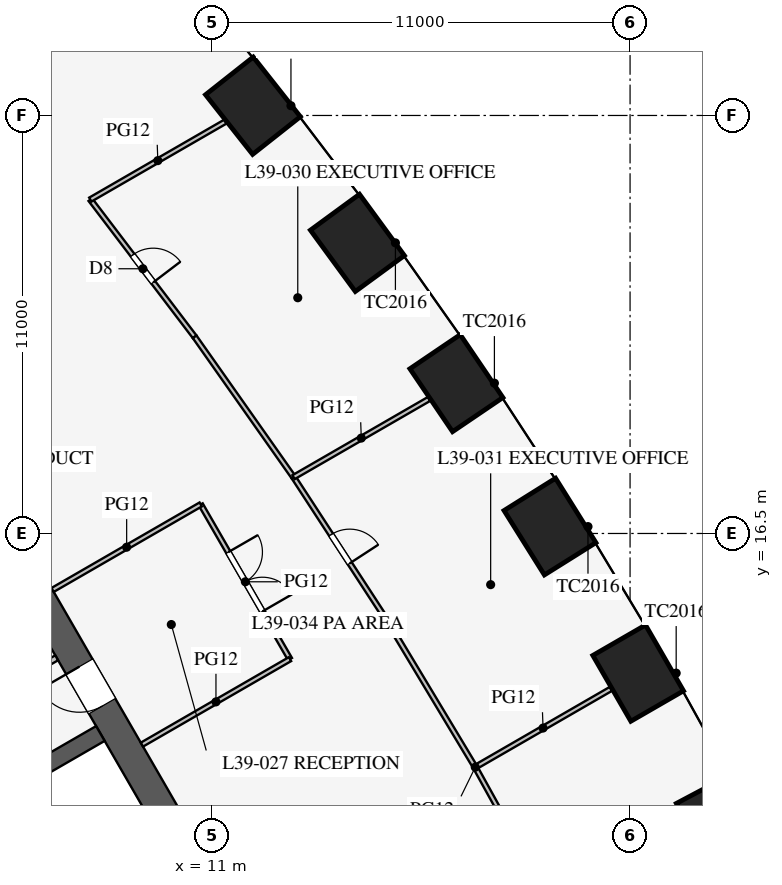
"""IFC4 building model, lengths in metres.
Left out: names, types, materials, properties, quantities, classifications, styles, units other than length and angle.
Written with IfcOpenShell. Run it as: python <this file> out.ifc"""

import sys

from ifc_helpers import new_model, si_unit, direction, frame, frame_2d, origin, origin_2d, place, context, subcontext, project, spatial, rectangle, extrude, element, fill, save


model = new_model("IFC4")
c1 = context("Model", 3, precision=1e-05, world=origin(), true_north=direction((0.0, 1.0)))
c2 = subcontext(c1, "Body", "Model", "MODEL_VIEW")
j1 = project(units=[si_unit("LENGTHUNIT", "METRE"), si_unit("PLANEANGLEUNIT", "RADIAN")], contexts=[c1])
p1 = place(None, origin())
s1 = spatial("IfcSite", under=j1, at=p1, CompositionType="ELEMENT")
p2 = place(p1, origin())
s2 = spatial("IfcBuilding", under=s1, at=p2, CompositionType="ELEMENT")
p3 = place(p2, frame((0.0, 0.0, 170.3)))
s3 = spatial("IfcBuildingStorey", under=s2, at=p3, CompositionType="ELEMENT", Elevation=170.3)
for number, where, z_axis, x_axis in (
    (1, (24.393, 8.887, 0.0), (0.0, 0.0, 1.0), (-0.468, 0.883, 0.0)),
    (2, (22.213, 12.825, 0.0), (0.0, 0.0, 1.0), (-0.5, 0.866, 0.0)),
    (3, (19.893, 16.681, 0.0), (0.0, 0.0, 1.0), (-0.531, 0.847, 0.0)),
    (4, (17.43, 20.456, 0.0), (0.0, 0.0, 1.0), (-0.561, 0.828, 0.0)),
    (5, (14.825, 24.148, 0.0), (0.0, 0.0, 1.0), (-0.591, 0.807, 0.0)),
    (6, (12.077, 27.757, 0.0), (0.0, 0.0, 1.0), (-0.62, 0.785, 0.0)),
):
    element("IfcColumn", number, at=place(p3, frame(where, z_axis=z_axis, x_axis=x_axis)), inside=s3, PredefinedType="COLUMN", context=c2, shape_type="SweptSolid", body=[
        extrude(rectangle(XDim=2.0, YDim=1.6, at=origin_2d()), origin(), (0.0, 0.0, 1.0), 4.2),
    ])
p4 = place(p3, frame((16.743, -3.0, 0.0), z_axis=(0.0, 0.0, 1.0), x_axis=(-0.500002442456, 0.866023993627, 0.0)))
e7 = element("IfcWall", 7, at=p4, inside=s3, PredefinedType="SHEAR", context=c2, shape_type="SweptSolid", body=[
    extrude(rectangle(XDim=21.939, YDim=0.8, at=frame_2d((10.97, 0.0))), origin(), (0.0, 0.0, 1.0), 4.2),
])
p5 = place(p4, frame((17.27, 0.0, 0.0)))
e8 = element("IfcOpeningElement", 8, at=p5, cuts=e7, PredefinedType="OPENING", context=c2, shape_type="SweptSolid", body=[
    extrude(rectangle(XDim=1.2, YDim=2.1, at=frame_2d((0.6, 1.05))), frame((0.0, 0.41, 0.0), z_axis=(0.0, -1.0, 0.0), x_axis=(1.0, 0.0, 0.0)), (0.0, 0.0, 1.0), 0.82),
])
p6 = place(p4, frame((3.47, 0.0, 0.0)))
e9 = element("IfcOpeningElement", 9, at=p6, cuts=e7, PredefinedType="OPENING", context=c2, shape_type="SweptSolid", body=[
    extrude(rectangle(XDim=1.2, YDim=2.1, at=frame_2d((0.6, 1.05))), frame((0.0, 0.41, 0.0), z_axis=(0.0, -1.0, 0.0), x_axis=(1.0, 0.0, 0.0)), (0.0, 0.0, 1.0), 0.82),
])
p7 = place(p3, frame((11.424, 0.014, 0.0), z_axis=(0.0, 0.0, 1.0), x_axis=(-0.500001763848, 0.866024385424, 0.0)))
e10 = element("IfcWall", 10, at=p7, inside=s3, PredefinedType="SHEAR", context=c2, shape_type="SweptSolid", body=[
    extrude(rectangle(XDim=11.4, YDim=0.25, at=frame_2d((5.7, 0.0))), origin(), (0.0, 0.0, 1.0), 4.2),
])
p8 = place(p7, frame((0.975, 0.0, 0.0)))
e11 = element("IfcOpeningElement", 11, at=p8, cuts=e10, PredefinedType="OPENING", context=c2, shape_type="SweptSolid", body=[
    extrude(rectangle(XDim=0.9, YDim=2.1, at=frame_2d((0.45, 1.05))), frame((0.0, 0.135, 0.0), z_axis=(0.0, -1.0, 0.0), x_axis=(1.0, 0.0, 0.0)), (0.0, 0.0, 1.0), 0.27),
])
p9 = place(p7, frame((3.825, 0.0, 0.0)))
e12 = element("IfcOpeningElement", 12, at=p9, cuts=e10, PredefinedType="OPENING", context=c2, shape_type="SweptSolid", body=[
    extrude(rectangle(XDim=0.9, YDim=2.1, at=frame_2d((0.45, 1.05))), frame((0.0, 0.135, 0.0), z_axis=(0.0, -1.0, 0.0), x_axis=(1.0, 0.0, 0.0)), (0.0, 0.0, 1.0), 0.27),
])
p10 = place(p3, frame((5.832, 9.949, 0.0), z_axis=(0.0, 0.0, 1.0), x_axis=(0.866029291668, 0.499993265928, 0.0)))
e13 = element("IfcWall", 13, at=p10, inside=s3, PredefinedType="SHEAR", context=c2, shape_type="SweptSolid", body=[
    extrude(rectangle(XDim=2.575, YDim=0.45, at=frame_2d((1.288, 0.0))), origin(), (0.0, 0.0, 1.0), 4.2),
])
p11 = place(p3, frame((2.495, 10.678, 0.0), z_axis=(0.0, 0.0, 1.0), x_axis=(0.86602216432, 0.500005610874, 0.0)))
e14 = element("IfcWall", 14, at=p11, inside=s3, PredefinedType="PARTITIONING", context=c2, shape_type="SweptSolid", body=[
    extrude(rectangle(XDim=5.1, YDim=0.15, at=frame_2d((2.55, 0.0))), origin(), (0.0, 0.0, 1.0), 4.0),
])
p12 = place(p11, frame((1.3, 0.0, 0.0)))
e15 = element("IfcOpeningElement", 15, at=p12, cuts=e14, PredefinedType="OPENING", context=c2, shape_type="SweptSolid", body=[
    extrude(rectangle(XDim=0.9, YDim=2.1, at=frame_2d((0.45, 1.05))), frame((0.0, 0.085, 0.0), z_axis=(0.0, -1.0, 0.0), x_axis=(1.0, 0.0, 0.0)), (0.0, 0.0, 1.0), 0.17),
])
p13 = place(p3, frame((13.052, 13.194, 0.0), z_axis=(0.0, 0.0, 1.0), x_axis=(-0.499977259774, 0.866038532462, 0.0)))
e16 = element("IfcWall", 16, at=p13, inside=s3, PredefinedType="PARTITIONING", context=c2, shape_type="SweptSolid", body=[
    extrude(rectangle(XDim=4.7, YDim=0.12, at=frame_2d((2.35, 0.0))), origin(), (0.0, 0.0, 1.0), 2.9),
])
p14 = place(p13, frame((1.45, 0.0, 0.15)))
e17 = element("IfcOpeningElement", 17, at=p14, cuts=e16, PredefinedType="OPENING", context=c2, shape_type="SweptSolid", body=[
    extrude(rectangle(XDim=1.8, YDim=2.1, at=frame_2d((0.9, 1.05))), frame((0.0, 0.07, 0.0), z_axis=(0.0, -1.0, 0.0), x_axis=(1.0, 0.0, 0.0)), (0.0, 0.0, 1.0), 0.14),
])
p15 = place(p3, frame((9.155, 10.944, 0.0), z_axis=(0.0, 0.0, 1.0), x_axis=(0.866017533419, 0.500013631625, 0.0)))
e18 = element("IfcWall", 18, at=p15, inside=s3, PredefinedType="PARTITIONING", context=c2, shape_type="SweptSolid", body=[
    extrude(rectangle(XDim=4.5, YDim=0.12, at=frame_2d((2.25, 0.0))), origin(), (0.0, 0.0, 1.0), 2.9),
])
p16 = place(p3, frame((6.805, 15.014, 0.0), z_axis=(0.0, 0.0, 1.0), x_axis=(0.866031096941, 0.499990139034, 0.0)))
e19 = element("IfcWall", 19, at=p16, inside=s3, PredefinedType="PARTITIONING", context=c2, shape_type="SweptSolid", body=[
    extrude(rectangle(XDim=4.5, YDim=0.12, at=frame_2d((2.25, 0.0))), origin(), (0.0, 0.0, 1.0), 2.9),
])
p17 = place(p3, frame((17.927, 10.35, 0.0), z_axis=(0.0, 0.0, 1.0), x_axis=(-0.515548366618, 0.856860479703, 0.0)))
e20 = element("IfcWall", 20, at=p17, inside=s3, PredefinedType="PARTITIONING", context=c2, shape_type="SweptSolid", body=[
    extrude(rectangle(XDim=4.501, YDim=0.12, at=frame_2d((2.25, 0.0))), origin(), (0.0, 0.0, 1.0), 2.9),
])
p18 = place(p3, frame((10.543, 21.675, 0.0), z_axis=(0.0, 0.0, 1.0), x_axis=(-0.605274299339, 0.796016973789, 0.0)))
e21 = element("IfcWall", 21, at=p18, inside=s3, PredefinedType="PARTITIONING", context=c2, shape_type="SweptSolid", body=[
    extrude(rectangle(XDim=4.536, YDim=0.12, at=frame_2d((2.268, 0.0))), origin(), (0.0, 0.0, 1.0), 2.9),
])
p19 = place(p18, frame((1.8, 0.0, 0.15)))
e22 = element("IfcOpeningElement", 22, at=p19, cuts=e21, PredefinedType="OPENING", context=c2, shape_type="SweptSolid", body=[
    extrude(rectangle(XDim=0.9, YDim=2.1, at=frame_2d((0.45, 1.05))), frame((0.0, 0.07, 0.0), z_axis=(0.0, -1.0, 0.0), x_axis=(1.0, 0.0, 0.0)), (0.0, 0.0, 1.0), 0.14),
])
p20 = place(p3, frame((15.606, 14.206, 0.0), z_axis=(0.0, 0.0, 1.0), x_axis=(-0.546069464151, 0.837739900161, 0.0)))
e23 = element("IfcWall", 23, at=p20, inside=s3, PredefinedType="PARTITIONING", context=c2, shape_type="SweptSolid", body=[
    extrude(rectangle(XDim=4.507, YDim=0.12, at=frame_2d((2.253, 0.0))), origin(), (0.0, 0.0, 1.0), 2.9),
])
p21 = place(p20, frame((1.8, 0.0, 0.15)))
e24 = element("IfcOpeningElement", 24, at=p21, cuts=e23, PredefinedType="OPENING", context=c2, shape_type="SweptSolid", body=[
    extrude(rectangle(XDim=0.9, YDim=2.1, at=frame_2d((0.45, 1.05))), frame((0.0, 0.07, 0.0), z_axis=(0.0, -1.0, 0.0), x_axis=(1.0, 0.0, 0.0)), (0.0, 0.0, 1.0), 0.14),
])
p22 = place(p3, frame((13.145, 17.982, 0.0), z_axis=(0.0, 0.0, 1.0), x_axis=(-0.575987178736, 0.817458726745, 0.0)))
e25 = element("IfcWall", 25, at=p22, inside=s3, PredefinedType="PARTITIONING", context=c2, shape_type="SweptSolid", body=[
    extrude(rectangle(XDim=4.518, YDim=0.12, at=frame_2d((2.259, 0.0))), origin(), (0.0, 0.0, 1.0), 2.9),
])
p23 = place(p3, frame((20.106, 6.412, 0.0), z_axis=(0.0, 0.0, 1.0), x_axis=(-0.484292898211, 0.874905931368, 0.0)))
e26 = element("IfcWall", 26, at=p23, inside=s3, PredefinedType="PARTITIONING", context=c2, shape_type="SweptSolid", body=[
    extrude(rectangle(XDim=4.501, YDim=0.12, at=frame_2d((2.25, 0.0))), origin(), (0.0, 0.0, 1.0), 2.9),
])
p24 = place(p23, frame((1.8, 0.0, 0.15)))
e27 = element("IfcOpeningElement", 27, at=p24, cuts=e26, PredefinedType="OPENING", context=c2, shape_type="SweptSolid", body=[
    extrude(rectangle(XDim=0.9, YDim=2.1, at=frame_2d((0.45, 1.05))), frame((0.0, 0.07, 0.0), z_axis=(0.0, -1.0, 0.0), x_axis=(1.0, 0.0, 0.0)), (0.0, 0.0, 1.0), 0.14),
])
p25 = place(p3, frame((17.927, 10.35, 0.0), z_axis=(0.0, 0.0, 1.0), x_axis=(0.866009926209, 0.50002680699, 0.0)))
e28 = element("IfcWall", 28, at=p25, inside=s3, PredefinedType="PARTITIONING", context=c2, shape_type="SweptSolid", body=[
    extrude(rectangle(XDim=4.12, YDim=0.12, at=frame_2d((2.06, 0.0))), origin(), (0.0, 0.0, 1.0), 2.6),
])
p26 = place(p3, frame((7.797, 25.286, 0.0), z_axis=(0.0, 0.0, 1.0), x_axis=(0.866019112135, 0.500010897298, 0.0)))
e29 = element("IfcWall", 29, at=p26, inside=s3, PredefinedType="PARTITIONING", context=c2, shape_type="SweptSolid", body=[
    extrude(rectangle(XDim=4.103, YDim=0.12, at=frame_2d((2.052, 0.0))), origin(), (0.0, 0.0, 1.0), 2.4),
])
p27 = place(p3, frame((13.145, 17.982, 0.0), z_axis=(0.0, 0.0, 1.0), x_axis=(0.866018637367, 0.500011719595, 0.0)))
e30 = element("IfcWall", 30, at=p27, inside=s3, PredefinedType="PARTITIONING", context=c2, shape_type="SweptSolid", body=[
    extrude(rectangle(XDim=4.116, YDim=0.12, at=frame_2d((2.058, 0.0))), origin(), (0.0, 0.0, 1.0), 2.6),
])
p28 = place(p5, origin())
e31 = element("IfcDoor", 31, at=p28, inside=s3, OperationType="SINGLE_SWING_RIGHT", PredefinedType="DOOR", context=c2, shape_type="SweptSolid", body=[
    extrude(rectangle(XDim=1.2, YDim=2.1, at=frame_2d((0.6, 1.05))), frame((0.0, 0.025, 0.0), z_axis=(0.0, -1.0, 0.0), x_axis=(1.0, 0.0, 0.0)), (0.0, 0.0, 1.0), 0.05),
])
fill(e8, e31)
p29 = place(p14, frame((1.8, 0.0, 0.0), z_axis=(0.0, 0.0, 1.0), x_axis=(-1.0, 0.0, 0.0)))
e32 = element("IfcDoor", 32, at=p29, inside=s3, OperationType="DOUBLE_DOOR_SINGLE_SWING", PredefinedType="DOOR", context=c2, shape_type="SweptSolid", body=[
    extrude(rectangle(XDim=1.8, YDim=2.1, at=frame_2d((0.9, 1.05))), frame((0.0, 0.025, 0.0), z_axis=(0.0, -1.0, 0.0), x_axis=(1.0, 0.0, 0.0)), (0.0, 0.0, 1.0), 0.05),
])
fill(e17, e32)
p30 = place(p19, frame((0.9, 0.0, 0.0), z_axis=(0.0, 0.0, 1.0), x_axis=(-1.0, 0.0, 0.0)))
e33 = element("IfcDoor", 33, at=p30, inside=s3, OperationType="SINGLE_SWING_RIGHT", PredefinedType="DOOR", context=c2, shape_type="SweptSolid", body=[
    extrude(rectangle(XDim=0.9, YDim=2.1, at=frame_2d((0.45, 1.05))), frame((0.0, 0.025, 0.0), z_axis=(0.0, -1.0, 0.0), x_axis=(1.0, 0.0, 0.0)), (0.0, 0.0, 1.0), 0.05),
])
fill(e22, e33)
p31 = place(p21, frame((0.9, 0.0, 0.0), z_axis=(0.0, 0.0, 1.0), x_axis=(-1.0, 0.0, 0.0)))
e34 = element("IfcDoor", 34, at=p31, inside=s3, OperationType="SINGLE_SWING_RIGHT", PredefinedType="DOOR", context=c2, shape_type="SweptSolid", body=[
    extrude(rectangle(XDim=0.9, YDim=2.1, at=frame_2d((0.45, 1.05))), frame((0.0, 0.025, 0.0), z_axis=(0.0, -1.0, 0.0), x_axis=(1.0, 0.0, 0.0)), (0.0, 0.0, 1.0), 0.05),
])
fill(e24, e34)
save(model, sys.argv[1])
